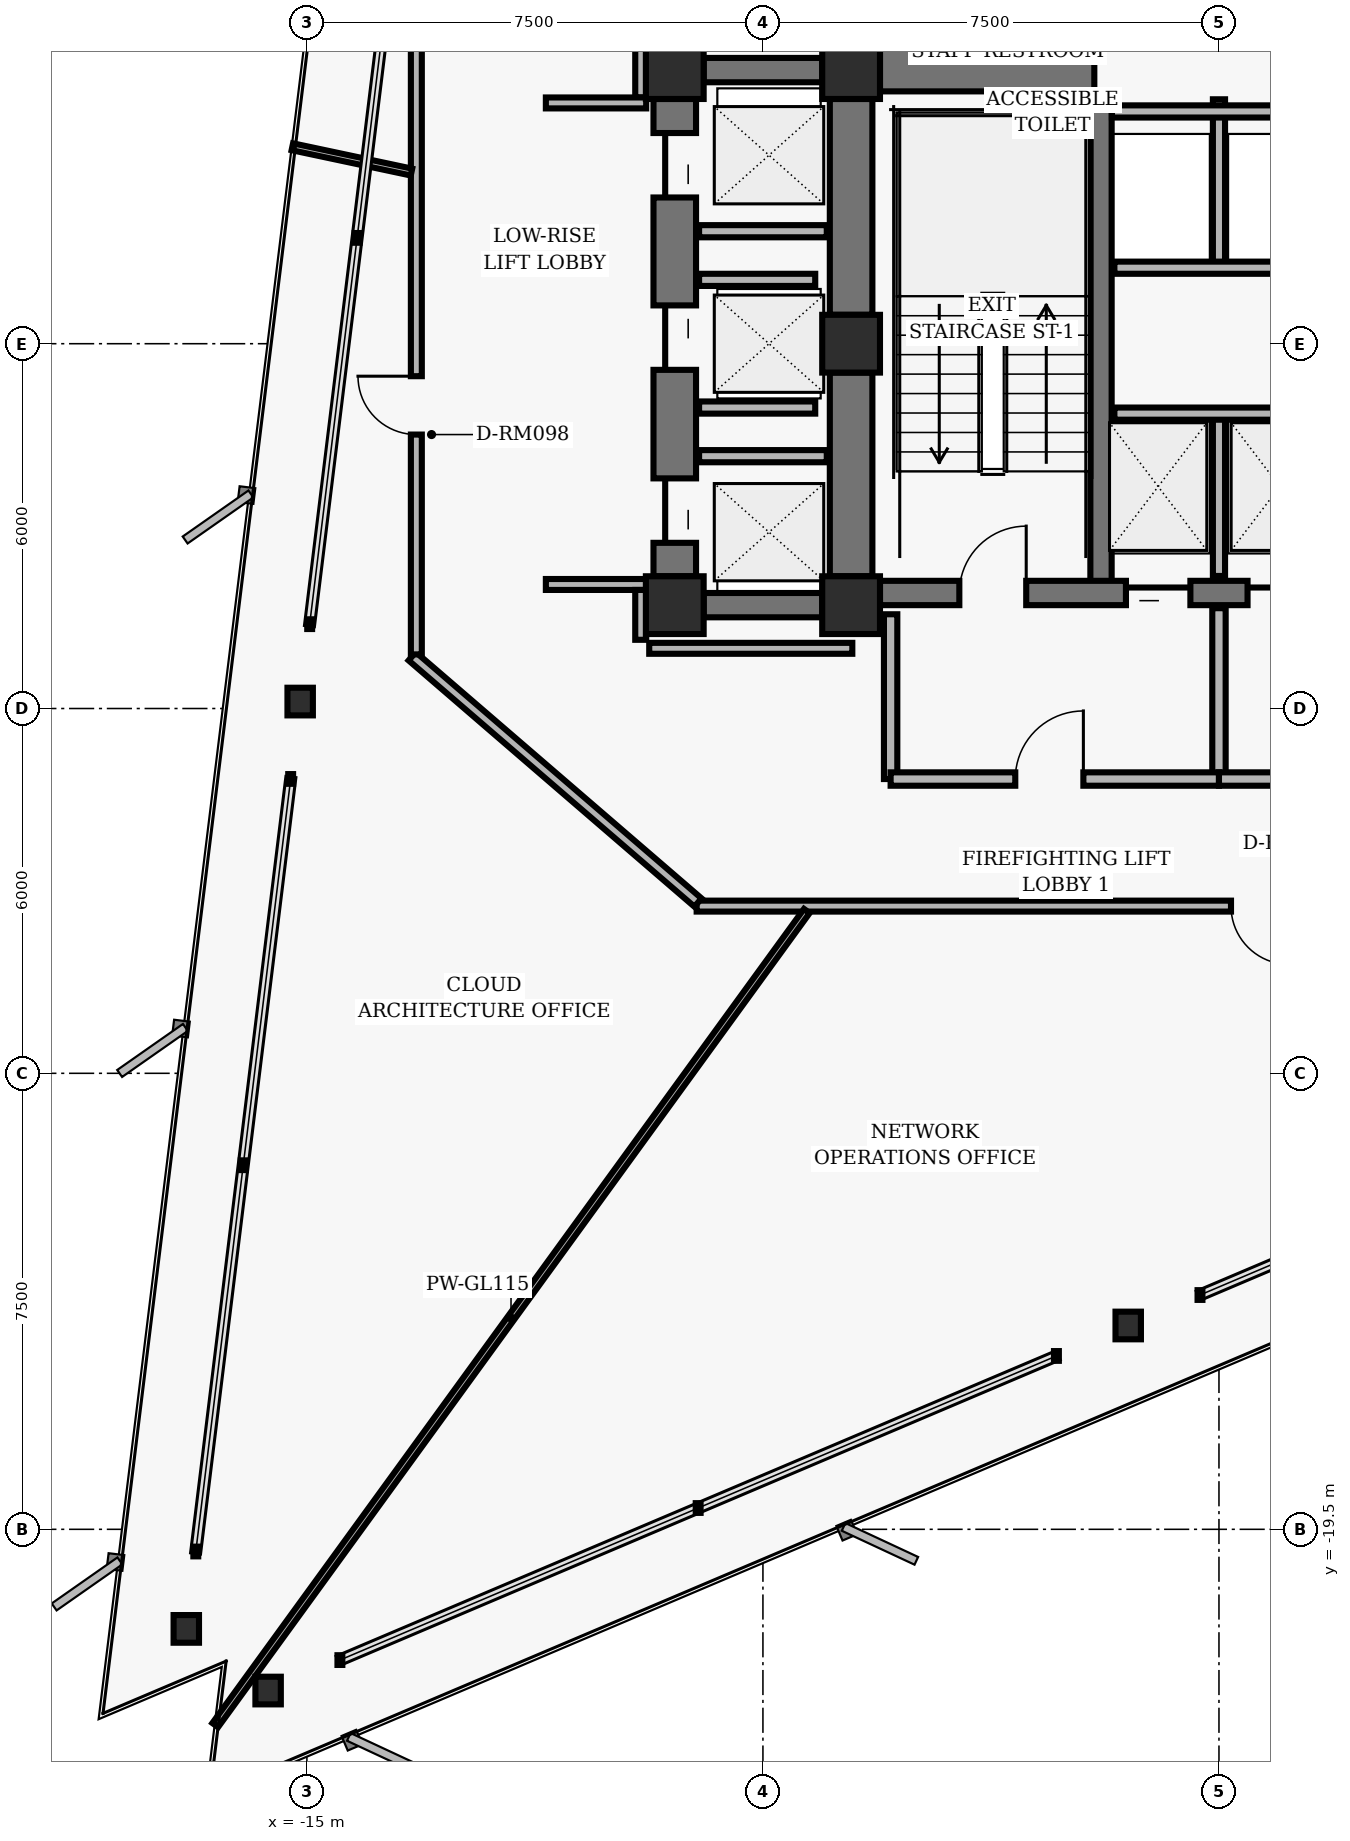
"""IFC4 building model, lengths in metres.
Left out: names, types, materials, properties, quantities, classifications, styles, units other than length and angle.
Written with IfcOpenShell. Run it as: python <this file> out.ifc"""

import sys

from ifc_helpers import new_model, si_unit, direction, frame, frame_2d, origin, origin_2d, place, context, subcontext, project, spatial, rectangle, hollow_rectangle, i_section, extrude, element, fill, save


model = new_model("IFC4")
c1 = context("Model", 3, precision=1e-05, world=origin(), true_north=direction((0.0, 1.0)))
c2 = subcontext(c1, "Body", "Model", "MODEL_VIEW")
j1 = project(units=[si_unit("LENGTHUNIT", "METRE"), si_unit("PLANEANGLEUNIT", "RADIAN")], contexts=[c1])
p1 = place(None, origin())
s1 = spatial("IfcSite", under=j1, at=p1, CompositionType="ELEMENT")
p2 = place(p1, origin())
s2 = spatial("IfcBuilding", under=s1, at=p2, CompositionType="ELEMENT")
p3 = place(p2, frame((0.0, 0.0, 69.76)))
s3 = spatial("IfcBuildingStorey", under=s2, at=p3, CompositionType="ELEMENT", Elevation=69.76)
for number, where, z_axis, x_axis in (
    (1, (-6.05, 4.5, 0.0), (0.0, 0.0, 1.0), (1.0, 0.0, 0.0)),
    (2, (-6.05, 0.0, 0.0), (0.0, 0.0, 1.0), (1.0, 0.0, 0.0)),
    (3, (-6.05, -4.3, 0.0), (0.0, 0.0, 1.0), (1.0, 0.0, 0.0)),
    (4, (-8.95, 4.5, 0.0), (0.0, 0.0, 1.0), (1.0, 0.0, 0.0)),
    (5, (-8.95, -4.3, 0.0), (0.0, 0.0, 1.0), (1.0, 0.0, 0.0)),
):
    element("IfcColumn", number, at=place(p3, frame(where, z_axis=z_axis, x_axis=x_axis)), inside=s3, PredefinedType="COLUMN", context=c2, shape_type="SweptSolid", body=[
        extrude(hollow_rectangle(XDim=0.95, YDim=0.95, WallThickness=0.06, InnerFilletRadius=0.02, OuterFilletRadius=0.04, at=origin_2d()), origin(), (0.0, 0.0, 1.0), 3.36),
    ])
p4 = place(p3, frame((-6.05, 0.475, 0.0), z_axis=(0.0, 0.0, 1.0), x_axis=(0.0, 1.0, 0.0)))
e6 = element("IfcWall", 6, at=p4, inside=s3, PredefinedType="SHEAR", context=c2, shape_type="SweptSolid", body=[
    extrude(rectangle(XDim=3.55, YDim=0.7, at=frame_2d((1.775, 0.0))), origin(), (0.0, 0.0, 1.0), 3.098),
])
p5 = place(p3, frame((-6.05, -3.825, 0.0), z_axis=(0.0, 0.0, 1.0), x_axis=(0.0, 1.0, 0.0)))
e7 = element("IfcWall", 7, at=p5, inside=s3, PredefinedType="SHEAR", context=c2, shape_type="SweptSolid", body=[
    extrude(rectangle(XDim=3.35, YDim=0.7, at=frame_2d((1.675, 0.0))), origin(), (0.0, 0.0, 1.0), 3.098),
])
p6 = place(p3, frame((-1.94, -4.1, 0.0), z_axis=(0.0, 0.0, 1.0), x_axis=(0.0, 1.0, 0.0)))
e8 = element("IfcWall", 8, at=p6, inside=s3, PredefinedType="SHEAR", context=c2, shape_type="SweptSolid", body=[
    extrude(rectangle(XDim=8.2, YDim=0.35, at=frame_2d((4.1, 0.0))), origin(), (0.0, 0.0, 1.0), 3.098),
])
p7 = place(p3, frame((-5.575, -4.1, 0.0), z_axis=(0.0, 0.0, 1.0), x_axis=(1.0, 0.0, 0.0)))
e9 = element("IfcWall", 9, at=p7, inside=s3, PredefinedType="SHEAR", context=c2, shape_type="SweptSolid", body=[
    extrude(rectangle(XDim=11.15, YDim=0.4, at=frame_2d((5.575, 0.0))), origin(), (0.0, 0.0, 1.0), 3.098),
])
p8 = place(p7, frame((1.305, 0.0, 0.0)))
e10 = element("IfcOpeningElement", 10, at=p8, cuts=e9, PredefinedType="OPENING", context=c2, shape_type="SweptSolid", body=[
    extrude(rectangle(XDim=1.1, YDim=2.04, at=frame_2d((0.55, 1.02))), frame((0.0, 0.21, 0.0), z_axis=(0.0, -1.0, 0.0), x_axis=(1.0, 0.0, 0.0)), (0.0, 0.0, 1.0), 0.42),
])
p9 = place(p7, frame((8.745, 0.0, 0.0)))
e11 = element("IfcOpeningElement", 11, at=p9, cuts=e9, PredefinedType="OPENING", context=c2, shape_type="SweptSolid", body=[
    extrude(rectangle(XDim=1.1, YDim=2.04, at=frame_2d((0.55, 1.02))), frame((0.0, 0.21, 0.0), z_axis=(0.0, -1.0, 0.0), x_axis=(1.0, 0.0, 0.0)), (0.0, 0.0, 1.0), 0.42),
])
p10 = place(p7, frame((4.045, 0.0, 0.0)))
e12 = element("IfcOpeningElement", 12, at=p10, cuts=e9, PredefinedType="OPENING", context=c2, shape_type="SweptSolid", body=[
    extrude(rectangle(XDim=1.06, YDim=2.04, at=frame_2d((0.53, 1.02))), frame((0.0, 0.21, 0.0), z_axis=(0.0, -1.0, 0.0), x_axis=(1.0, 0.0, 0.0)), (0.0, 0.0, 1.0), 0.42),
])
p11 = place(p7, frame((6.045, 0.0, 0.0)))
e13 = element("IfcOpeningElement", 13, at=p11, cuts=e9, PredefinedType="OPENING", context=c2, shape_type="SweptSolid", body=[
    extrude(rectangle(XDim=1.06, YDim=2.04, at=frame_2d((0.53, 1.02))), frame((0.0, 0.21, 0.0), z_axis=(0.0, -1.0, 0.0), x_axis=(1.0, 0.0, 0.0)), (0.0, 0.0, 1.0), 0.42),
])
p12 = place(p3, frame((-5.575, 4.5, 0.0), z_axis=(0.0, 0.0, 1.0), x_axis=(1.0, 0.0, 0.0)))
e14 = element("IfcWall", 14, at=p12, inside=s3, PredefinedType="SHEAR", context=c2, shape_type="SweptSolid", body=[
    extrude(rectangle(XDim=3.525, YDim=0.7, at=frame_2d((1.762, 0.0))), origin(), (0.0, 0.0, 1.0), 3.098),
])
p13 = place(p3, frame((-8.95, -3.825, 0.0), z_axis=(0.0, 0.0, 1.0), x_axis=(0.0, 1.0, 0.0)))
e15 = element("IfcWall", 15, at=p13, inside=s3, PredefinedType="SHEAR", context=c2, shape_type="SweptSolid", body=[
    extrude(rectangle(XDim=7.85, YDim=0.7, at=frame_2d((3.925, 0.0))), origin(), (0.0, 0.0, 1.0), 3.098),
])
p14 = place(p13, frame((0.55, 0.0, 0.0)))
e16 = element("IfcOpeningElement", 16, at=p14, cuts=e15, PredefinedType="OPENING", context=c2, shape_type="SweptSolid", body=[
    extrude(rectangle(XDim=1.06, YDim=2.04, at=frame_2d((0.53, 1.02))), frame((0.0, 0.36, 0.0), z_axis=(0.0, -1.0, 0.0), x_axis=(1.0, 0.0, 0.0)), (0.0, 0.0, 1.0), 0.72),
])
p15 = place(p13, frame((3.395, 0.0, 0.0)))
e17 = element("IfcOpeningElement", 17, at=p15, cuts=e15, PredefinedType="OPENING", context=c2, shape_type="SweptSolid", body=[
    extrude(rectangle(XDim=1.06, YDim=2.04, at=frame_2d((0.53, 1.02))), frame((0.0, 0.36, 0.0), z_axis=(0.0, -1.0, 0.0), x_axis=(1.0, 0.0, 0.0)), (0.0, 0.0, 1.0), 0.72),
])
p16 = place(p13, frame((6.23, 0.0, 0.0)))
e18 = element("IfcOpeningElement", 18, at=p16, cuts=e15, PredefinedType="OPENING", context=c2, shape_type="SweptSolid", body=[
    extrude(rectangle(XDim=1.06, YDim=2.04, at=frame_2d((0.53, 1.02))), frame((0.0, 0.36, 0.0), z_axis=(0.0, -1.0, 0.0), x_axis=(1.0, 0.0, 0.0)), (0.0, 0.0, 1.0), 0.72),
])
for number, where, z_axis, x_axis in (
    (19, (-8.475, 4.5, 0.0), (0.0, 0.0, 1.0), (1.0, 0.0, 0.0)),
    (20, (-8.475, -4.3, 0.0), (0.0, 0.0, 1.0), (1.0, 0.0, 0.0)),
):
    element("IfcWall", number, at=place(p3, frame(where, z_axis=z_axis, x_axis=x_axis)), inside=s3, PredefinedType="SHEAR", context=c2, shape_type="SweptSolid", body=[
        extrude(rectangle(XDim=1.95, YDim=0.4, at=frame_2d((0.975, 0.0))), origin(), (0.0, 0.0, 1.0), 3.098),
    ])
for number, where, z_axis, x_axis in (
    (21, (-15.111, -5.886, 0.0), (0.0, 0.0, 1.0), (1.0, 0.0, 0.0)),
    (22, (-16.983, -21.138, 0.0), (0.0, 0.0, 1.0), (1.0, 0.0, 0.0)),
    (23, (-15.638, -22.152, 0.0), (0.0, 0.0, 1.0), (1.0, 0.0, 0.0)),
    (24, (-1.493, -16.148, 0.0), (0.0, 0.0, 1.0), (1.0, 0.0, 0.0)),
):
    element("IfcColumn", number, at=place(p3, frame(where, z_axis=z_axis, x_axis=x_axis)), inside=s3, PredefinedType="COLUMN", context=c2, shape_type="SweptSolid", body=[
        extrude(i_section(OverallWidth=0.418, OverallDepth=0.455, WebThickness=0.042, FlangeThickness=0.068, FilletRadius=0.025, at=origin_2d()), origin(), (0.0, 0.0, 1.0), 3.36),
    ])
p17 = place(p3, frame((0.0, -3.82, 0.0), z_axis=(0.0, 0.0, 1.0), x_axis=(0.0, 1.0, 0.0)))
e25 = element("IfcWall", 25, at=p17, inside=s3, PredefinedType="PARTITIONING", context=c2, shape_type="SweptSolid", body=[
    extrude(rectangle(XDim=2.67, YDim=0.2, at=frame_2d((1.335, 0.0))), origin(), (0.0, 0.0, 1.0), 3.073),
])
p18 = place(p3, frame((-1.72, -1.15, 0.0), z_axis=(0.0, 0.0, 1.0), x_axis=(1.0, 0.0, 0.0)))
e26 = element("IfcWall", 26, at=p18, inside=s3, PredefinedType="PARTITIONING", context=c2, shape_type="SweptSolid", body=[
    extrude(rectangle(XDim=3.44, YDim=0.2, at=frame_2d((1.72, 0.0))), origin(), (0.0, 0.0, 1.0), 3.073),
])
p19 = place(p3, frame((-5.4, -7.16, 0.0), z_axis=(0.0, 0.0, 1.0), x_axis=(0.0, 1.0, 0.0)))
e27 = element("IfcWall", 27, at=p19, inside=s3, PredefinedType="PARTITIONING", context=c2, shape_type="SweptSolid", body=[
    extrude(rectangle(XDim=2.71, YDim=0.22, at=frame_2d((1.355, 0.0))), origin(), (0.0, 0.0, 1.0), 3.073),
])
p20 = place(p3, frame((0.0, -7.16, 0.0), z_axis=(0.0, 0.0, 1.0), x_axis=(0.0, 1.0, 0.0)))
e28 = element("IfcWall", 28, at=p20, inside=s3, PredefinedType="PARTITIONING", context=c2, shape_type="SweptSolid", body=[
    extrude(rectangle(XDim=2.81, YDim=0.22, at=frame_2d((1.405, 0.0))), origin(), (0.0, 0.0, 1.0), 3.073),
])
p21 = place(p3, frame((-5.4, -7.16, 0.0), z_axis=(0.0, 0.0, 1.0), x_axis=(1.0, 0.0, 0.0)))
e29 = element("IfcWall", 29, at=p21, inside=s3, PredefinedType="PARTITIONING", context=c2, shape_type="SweptSolid", body=[
    extrude(rectangle(XDim=5.4, YDim=0.22, at=frame_2d((2.7, 0.0))), origin(), (0.0, 0.0, 1.0), 2.587),
])
p22 = place(p21, frame((2.05, 0.0, 0.0)))
e30 = element("IfcOpeningElement", 30, at=p22, cuts=e29, PredefinedType="OPENING", context=c2, shape_type="SweptSolid", body=[
    extrude(rectangle(XDim=1.12, YDim=2.02, at=frame_2d((0.56, 1.01))), frame((0.0, 0.12, 0.0), z_axis=(0.0, -1.0, 0.0), x_axis=(1.0, 0.0, 0.0)), (0.0, 0.0, 1.0), 0.24),
])
p23 = place(p3, frame((0.0, -7.16, 0.0), z_axis=(0.0, 0.0, 1.0), x_axis=(1.0, 0.0, 0.0)))
e31 = element("IfcWall", 31, at=p23, inside=s3, PredefinedType="PARTITIONING", context=c2, shape_type="SweptSolid", body=[
    extrude(rectangle(XDim=5.4, YDim=0.22, at=frame_2d((2.7, 0.0))), origin(), (0.0, 0.0, 1.0), 2.587),
])
p24 = place(p23, frame((2.05, 0.0, 0.0)))
e32 = element("IfcOpeningElement", 32, at=p24, cuts=e31, PredefinedType="OPENING", context=c2, shape_type="SweptSolid", body=[
    extrude(rectangle(XDim=1.12, YDim=2.02, at=frame_2d((0.56, 1.01))), frame((0.0, 0.12, 0.0), z_axis=(0.0, -1.0, 0.0), x_axis=(1.0, 0.0, 0.0)), (0.0, 0.0, 1.0), 0.24),
])
p25 = place(p3, frame((0.0, 1.25, 0.0), z_axis=(0.0, 0.0, 1.0), x_axis=(0.0, 1.0, 0.0)))
e33 = element("IfcWall", 33, at=p25, inside=s3, PredefinedType="PARTITIONING", context=c2, shape_type="SweptSolid", body=[
    extrude(rectangle(XDim=2.77, YDim=0.2, at=frame_2d((1.385, 0.0))), origin(), (0.0, 0.0, 1.0), 3.073),
])
p26 = place(p3, frame((-1.72, 1.25, 0.0), z_axis=(0.0, 0.0, 1.0), x_axis=(1.0, 0.0, 0.0)))
e34 = element("IfcWall", 34, at=p26, inside=s3, PredefinedType="PARTITIONING", context=c2, shape_type="SweptSolid", body=[
    extrude(rectangle(XDim=3.44, YDim=0.2, at=frame_2d((1.72, 0.0))), origin(), (0.0, 0.0, 1.0), 3.073),
])
p27 = place(p3, frame((-1.76, 3.82, 0.0), z_axis=(0.0, 0.0, 1.0), x_axis=(1.0, 0.0, 0.0)))
e35 = element("IfcWall", 35, at=p27, inside=s3, PredefinedType="PARTITIONING", context=c2, shape_type="SweptSolid", body=[
    extrude(rectangle(XDim=3.52, YDim=0.2, at=frame_2d((1.76, 0.0))), origin(), (0.0, 0.0, 1.0), 3.073),
])
for number, where, z_axis, x_axis in (
    (36, (-8.55, -1.85, 0.0), (0.0, 0.0, 1.0), (1.0, 0.0, 0.0)),
    (37, (-8.55, 1.85, 0.0), (0.0, 0.0, 1.0), (1.0, 0.0, 0.0)),
):
    element("IfcWall", number, at=place(p3, frame(where, z_axis=z_axis, x_axis=x_axis)), inside=s3, PredefinedType="PARTITIONING", context=c2, shape_type="SweptSolid", body=[
        extrude(rectangle(XDim=2.1, YDim=0.2, at=frame_2d((1.05, 0.0))), origin(), (0.0, 0.0, 1.0), 3.073),
    ])
for number, where, z_axis, x_axis in (
    (38, (-8.55, -1.05, 0.0), (0.0, 0.0, 1.0), (1.0, 0.0, 0.0)),
    (39, (-8.55, 1.05, 0.0), (0.0, 0.0, 1.0), (1.0, 0.0, 0.0)),
):
    element("IfcWall", number, at=place(p3, frame(where, z_axis=z_axis, x_axis=x_axis)), inside=s3, PredefinedType="PARTITIONING", context=c2, shape_type="SweptSolid", body=[
        extrude(rectangle(XDim=1.91, YDim=0.2, at=frame_2d((0.955, 0.0))), origin(), (0.0, 0.0, 1.0), 3.073),
    ])
p28 = place(p3, frame((8.41, -9.25, 0.0), z_axis=(0.0, 0.0, 1.0), x_axis=(-1.0, 0.0, 0.0)))
e40 = element("IfcWall", 40, at=p28, inside=s3, PredefinedType="PARTITIONING", context=c2, shape_type="SweptSolid", body=[
    extrude(rectangle(XDim=17.0, YDim=0.18, at=frame_2d((8.5, 0.0))), origin(), (0.0, 0.0, 1.0), 2.587),
])
p29 = place(p28, frame((7.252, 0.0, 0.0)))
e41 = element("IfcOpeningElement", 41, at=p29, cuts=e40, PredefinedType="OPENING", context=c2, shape_type="SweptSolid", body=[
    extrude(rectangle(XDim=0.96, YDim=2.02, at=frame_2d((0.48, 1.01))), frame((0.0, 0.1, 0.0), z_axis=(0.0, -1.0, 0.0), x_axis=(1.0, 0.0, 0.0)), (0.0, 0.0, 1.0), 0.2),
])
p30 = place(p3, frame((-8.568, -9.191, 0.0), z_axis=(0.0, 0.0, 1.0), x_axis=(-0.757556899173, 0.652769135694, 0.0)))
e42 = element("IfcWall", 42, at=p30, inside=s3, PredefinedType="PARTITIONING", context=c2, shape_type="SweptSolid", body=[
    extrude(rectangle(XDim=6.204, YDim=0.18, at=frame_2d((3.102, 0.0))), origin(), (0.0, 0.0, 1.0), 3.073),
])
p31 = place(p3, frame((-13.2, -5.11, 0.0), z_axis=(0.0, 0.0, 1.0), x_axis=(0.0, 1.0, 0.0)))
e43 = element("IfcWall", 43, at=p31, inside=s3, PredefinedType="PARTITIONING", context=c2, shape_type="SweptSolid", body=[
    extrude(rectangle(XDim=10.22, YDim=0.18, at=frame_2d((5.11, 0.0))), origin(), (0.0, 0.0, 1.0), 2.587),
])
p32 = place(p31, frame((3.616, 0.0, 0.0)))
e44 = element("IfcOpeningElement", 44, at=p32, cuts=e43, PredefinedType="OPENING", context=c2, shape_type="SweptSolid", body=[
    extrude(rectangle(XDim=0.96, YDim=2.02, at=frame_2d((0.48, 1.01))), frame((0.0, 0.1, 0.0), z_axis=(0.0, -1.0, 0.0), x_axis=(1.0, 0.0, 0.0)), (0.0, 0.0, 1.0), 0.2),
])
p33 = place(p3, frame((-9.51, 4.87, 0.0), z_axis=(0.0, 0.0, 1.0), x_axis=(0.0, -1.0, 0.0)))
e45 = element("IfcWall", 45, at=p33, inside=s3, PredefinedType="PARTITIONING", context=c2, shape_type="SweptSolid", body=[
    extrude(rectangle(XDim=0.82, YDim=0.18, at=frame_2d((0.41, 0.0))), origin(), (0.0, 0.0, 1.0), 3.073),
])
for number, where, z_axis, x_axis in (
    (46, (-9.42, 3.96, 0.0), (0.0, 0.0, 1.0), (-1.0, 0.0, 0.0)),
    (47, (-11.07, -3.96, 0.0), (0.0, 0.0, 1.0), (1.0, 0.0, 0.0)),
):
    element("IfcWall", number, at=place(p3, frame(where, z_axis=z_axis, x_axis=x_axis)), inside=s3, PredefinedType="PARTITIONING", context=c2, shape_type="SweptSolid", body=[
        extrude(rectangle(XDim=1.65, YDim=0.18, at=frame_2d((0.825, 0.0))), origin(), (0.0, 0.0, 1.0), 3.073),
    ])
p34 = place(p3, frame((-9.51, -4.05, 0.0), z_axis=(0.0, 0.0, 1.0), x_axis=(0.0, -1.0, 0.0)))
e48 = element("IfcWall", 48, at=p34, inside=s3, PredefinedType="PARTITIONING", context=c2, shape_type="SweptSolid", body=[
    extrude(rectangle(XDim=0.82, YDim=0.18, at=frame_2d((0.41, 0.0))), origin(), (0.0, 0.0, 1.0), 3.073),
])
p35 = place(p3, frame((-9.37, -5.01, 0.0), z_axis=(0.0, 0.0, 1.0), x_axis=(1.0, 0.0, 0.0)))
e49 = element("IfcWall", 49, at=p35, inside=s3, PredefinedType="PARTITIONING", context=c2, shape_type="SweptSolid", body=[
    extrude(rectangle(XDim=3.34, YDim=0.18, at=frame_2d((1.67, 0.0))), origin(), (0.0, 0.0, 1.0), 3.073),
])
p36 = place(p3, frame((-6.779, -9.33, 0.0), z_axis=(0.0, 0.0, 1.0), x_axis=(-0.587788360635, -0.809014736023, 0.0)))
e50 = element("IfcWall", 50, at=p36, inside=s3, PredefinedType="MOVABLE", context=c2, shape_type="SweptSolid", body=[
    extrude(rectangle(XDim=16.552, YDim=0.115, at=frame_2d((8.276, 0.0))), origin(), (0.0, 0.0, 1.0), 2.358),
])
p37 = place(p3, frame((-13.28, 2.823, 0.0), z_axis=(0.0, 0.0, 1.0), x_axis=(-0.978147079353, 0.207914143705, 0.0)))
e51 = element("IfcWall", 51, at=p37, inside=s3, PredefinedType="MOVABLE", context=c2, shape_type="SweptSolid", body=[
    extrude(rectangle(XDim=2.003, YDim=0.115, at=frame_2d((1.001, 0.0))), origin(), (0.0, 0.0, 1.0), 3.073),
])
p38 = place(p8, origin())
e52 = element("IfcDoor", 52, at=p38, inside=s3, OperationType="SINGLE_SWING_RIGHT", PredefinedType="DOOR", context=c2, shape_type="SweptSolid", body=[
    extrude(rectangle(XDim=1.1, YDim=2.04, at=frame_2d((0.55, 1.02))), frame((0.0, 0.025, 0.0), z_axis=(0.0, -1.0, 0.0), x_axis=(1.0, 0.0, 0.0)), (0.0, 0.0, 1.0), 0.05),
])
fill(e10, e52)
p39 = place(p10, origin())
e53 = element("IfcDoor", 53, at=p39, inside=s3, OperationType="SLIDING_TO_LEFT", PredefinedType="DOOR", context=c2, shape_type="SweptSolid", body=[
    extrude(rectangle(XDim=1.06, YDim=2.04, at=frame_2d((0.53, 1.02))), frame((0.0, 0.025, 0.0), z_axis=(0.0, -1.0, 0.0), x_axis=(1.0, 0.0, 0.0)), (0.0, 0.0, 1.0), 0.05),
])
fill(e12, e53)
p40 = place(p11, origin())
e54 = element("IfcDoor", 54, at=p40, inside=s3, OperationType="SLIDING_TO_RIGHT", PredefinedType="DOOR", context=c2, shape_type="SweptSolid", body=[
    extrude(rectangle(XDim=1.06, YDim=2.04, at=frame_2d((0.53, 1.02))), frame((0.0, 0.025, 0.0), z_axis=(0.0, -1.0, 0.0), x_axis=(1.0, 0.0, 0.0)), (0.0, 0.0, 1.0), 0.05),
])
fill(e13, e54)
p41 = place(p22, origin())
e55 = element("IfcDoor", 55, at=p41, inside=s3, OperationType="SINGLE_SWING_RIGHT", PredefinedType="DOOR", context=c2, shape_type="SweptSolid", body=[
    extrude(rectangle(XDim=1.12, YDim=2.02, at=frame_2d((0.56, 1.01))), frame((0.0, 0.025, 0.0), z_axis=(0.0, -1.0, 0.0), x_axis=(1.0, 0.0, 0.0)), (0.0, 0.0, 1.0), 0.05),
])
fill(e30, e55)
p42 = place(p14, origin())
e56 = element("IfcDoor", 56, at=p42, inside=s3, OperationType="SLIDING_TO_LEFT", PredefinedType="DOOR", context=c2, shape_type="SweptSolid", body=[
    extrude(rectangle(XDim=1.06, YDim=2.04, at=frame_2d((0.53, 1.02))), frame((0.0, 0.025, 0.0), z_axis=(0.0, -1.0, 0.0), x_axis=(1.0, 0.0, 0.0)), (0.0, 0.0, 1.0), 0.05),
])
fill(e16, e56)
p43 = place(p15, origin())
e57 = element("IfcDoor", 57, at=p43, inside=s3, OperationType="SLIDING_TO_RIGHT", PredefinedType="DOOR", context=c2, shape_type="SweptSolid", body=[
    extrude(rectangle(XDim=1.06, YDim=2.04, at=frame_2d((0.53, 1.02))), frame((0.0, 0.025, 0.0), z_axis=(0.0, -1.0, 0.0), x_axis=(1.0, 0.0, 0.0)), (0.0, 0.0, 1.0), 0.05),
])
fill(e17, e57)
p44 = place(p16, origin())
e58 = element("IfcDoor", 58, at=p44, inside=s3, OperationType="SLIDING_TO_LEFT", PredefinedType="DOOR", context=c2, shape_type="SweptSolid", body=[
    extrude(rectangle(XDim=1.06, YDim=2.04, at=frame_2d((0.53, 1.02))), frame((0.0, 0.025, 0.0), z_axis=(0.0, -1.0, 0.0), x_axis=(1.0, 0.0, 0.0)), (0.0, 0.0, 1.0), 0.05),
])
fill(e18, e58)
p45 = place(p32, origin())
e59 = element("IfcDoor", 59, at=p45, inside=s3, OperationType="SINGLE_SWING_RIGHT", PredefinedType="DOOR", context=c2, shape_type="SweptSolid", body=[
    extrude(rectangle(XDim=0.96, YDim=2.02, at=frame_2d((0.48, 1.01))), frame((0.0, 0.025, 0.0), z_axis=(0.0, -1.0, 0.0), x_axis=(1.0, 0.0, 0.0)), (0.0, 0.0, 1.0), 0.05),
])
fill(e44, e59)
p46 = place(p29, origin())
e60 = element("IfcDoor", 60, at=p46, inside=s3, OperationType="SINGLE_SWING_LEFT", PredefinedType="DOOR", context=c2, shape_type="SweptSolid", body=[
    extrude(rectangle(XDim=0.96, YDim=2.02, at=frame_2d((0.48, 1.01))), frame((0.0, 0.025, 0.0), z_axis=(0.0, -1.0, 0.0), x_axis=(1.0, 0.0, 0.0)), (0.0, 0.0, 1.0), 0.05),
])
fill(e41, e60)
save(model, sys.argv[1])
